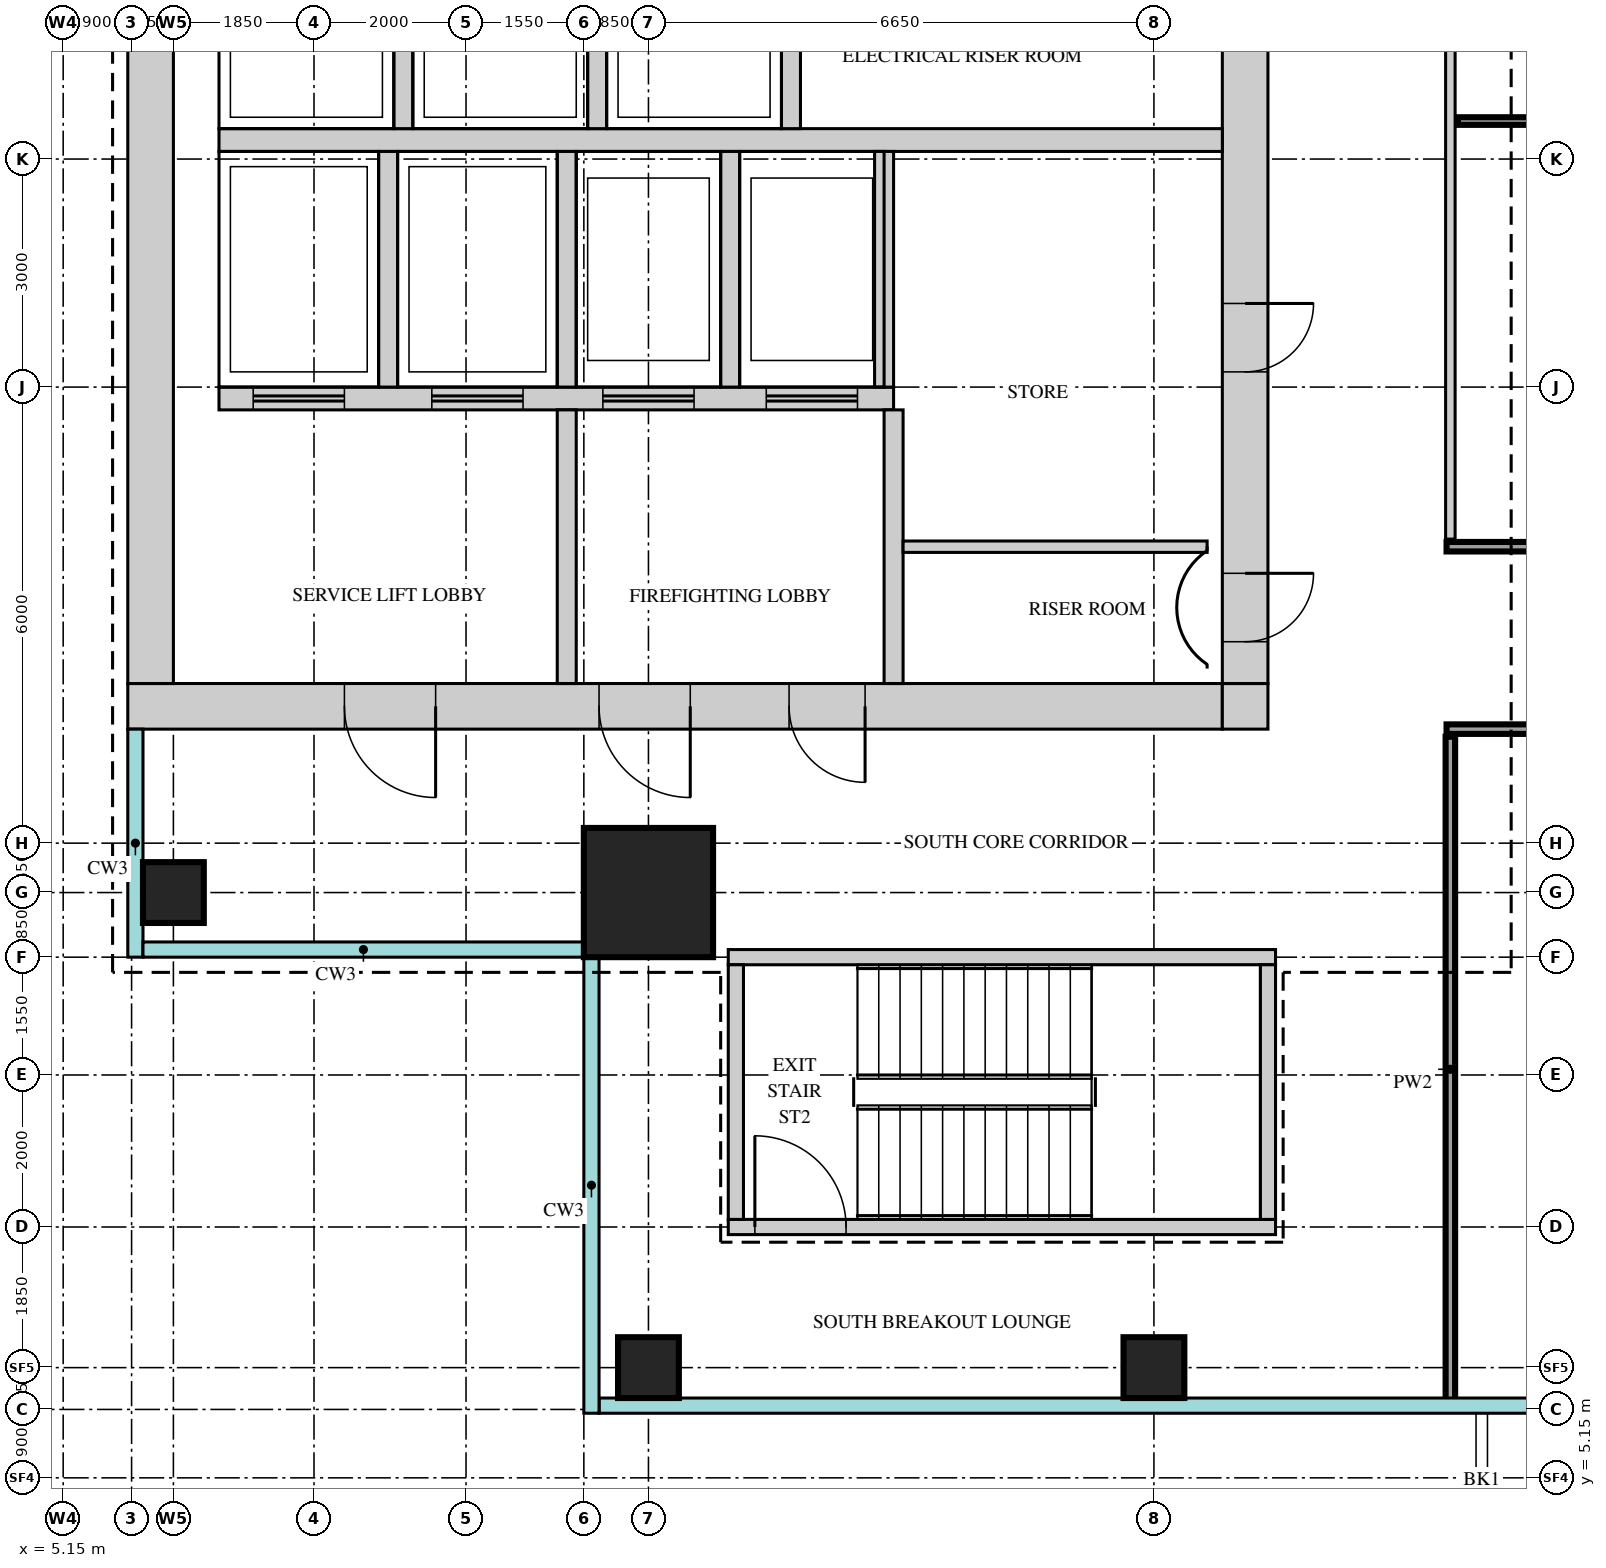
"""IFC4 building model, lengths in metres.
Left out: names, types, materials, properties, quantities, classifications, styles, units other than length and angle.
Written with IfcOpenShell. Run it as: python <this file> out.ifc"""

import sys

from ifc_helpers import new_model, si_unit, direction, frame, frame_2d, origin, origin_2d, place, context, subcontext, project, spatial, rectangle, extrude, source, transform, mapped, element, fill, save


model = new_model("IFC4")
c1 = context("Model", 3, precision=1e-05, world=origin(), true_north=direction((0.0, 1.0)))
c2 = subcontext(c1, "Body", "Model", "MODEL_VIEW")
j1 = project(units=[si_unit("LENGTHUNIT", "METRE"), si_unit("PLANEANGLEUNIT", "RADIAN")], contexts=[c1])
p1 = place(None, origin())
s1 = spatial("IfcSite", under=j1, at=p1, CompositionType="ELEMENT")
p2 = place(p1, origin())
s2 = spatial("IfcBuilding", under=s1, at=p2, CompositionType="ELEMENT")
p3 = place(p2, frame((0.0, 0.0, 298.2)))
s3 = spatial("IfcBuildingStorey", under=s2, at=p3, CompositionType="ELEMENT", Elevation=298.2)
m1 = source(origin(), c2, "Body", "SweptSolid", [
    extrude(rectangle(XDim=14.4, YDim=0.6, at=frame_2d((7.2, 0.0))), origin(), (0.0, 0.0, 1.0), 3.75),
])
p4 = place(p3, frame((6.0, 15.3, 0.0), z_axis=(0.0, 0.0, 1.0), x_axis=(1.0, 0.0, 0.0)))
e1 = element("IfcWall", 1, at=p4, inside=s3, PredefinedType="SHEAR", context=c2, shape_type="MappedRepresentation", body=[
    mapped(m1, transform((0.0, 0.0, 0.0))),
])
m2 = source(origin(), c2, "Body", "SweptSolid", [
    extrude(rectangle(XDim=1.2, YDim=2.1, at=frame_2d((0.6, 1.05))), frame((0.0, 0.31, 0.0), z_axis=(0.0, -1.0, 0.0), x_axis=(1.0, 0.0, 0.0)), (0.0, 0.0, 1.0), 0.62),
])
p5 = place(p4, frame((6.2, 0.0, 0.0)))
e2 = element("IfcOpeningElement", 2, at=p5, cuts=e1, PredefinedType="OPENING", context=c2, shape_type="MappedRepresentation", body=[
    mapped(m2, transform((0.0, 0.0, 0.0))),
])
p6 = place(p4, frame((2.85, 0.0, 0.0)))
e3 = element("IfcOpeningElement", 3, at=p6, cuts=e1, PredefinedType="OPENING", context=c2, shape_type="MappedRepresentation", body=[
    mapped(m2, transform((0.0, 0.0, 0.0))),
])
m3 = source(origin(), c2, "Body", "SweptSolid", [
    extrude(rectangle(XDim=1.0, YDim=2.1, at=frame_2d((0.5, 1.05))), frame((0.0, 0.31, 0.0), z_axis=(0.0, -1.0, 0.0), x_axis=(1.0, 0.0, 0.0)), (0.0, 0.0, 1.0), 0.62),
])
p7 = place(p4, frame((8.7, 0.0, 0.0)))
e4 = element("IfcOpeningElement", 4, at=p7, cuts=e1, PredefinedType="OPENING", context=c2, shape_type="MappedRepresentation", body=[
    mapped(m3, transform((0.0, 0.0, 0.0))),
])
m4 = source(origin(), c2, "Body", "SweptSolid", [
    extrude(rectangle(XDim=0.6, YDim=0.6, at=frame_2d((0.3, 0.0))), origin(), (0.0, 0.0, 1.0), 3.75),
])
p8 = place(p3, frame((20.4, 15.3, 0.0), z_axis=(0.0, 0.0, 1.0), x_axis=(1.0, 0.0, 0.0)))
e5 = element("IfcWall", 5, at=p8, inside=s3, PredefinedType="SHEAR", context=c2, shape_type="MappedRepresentation", body=[
    mapped(m4, transform((0.0, 0.0, 0.0))),
])
m5 = source(origin(), c2, "Body", "SweptSolid", [
    extrude(rectangle(XDim=22.8, YDim=0.6, at=frame_2d((11.4, 0.0))), origin(), (0.0, 0.0, 1.0), 3.75),
])
p9 = place(p3, frame((20.7, 15.6, 0.0), z_axis=(0.0, 0.0, 1.0), x_axis=(0.0, 1.0, 0.0)))
e6 = element("IfcWall", 6, at=p9, inside=s3, PredefinedType="SHEAR", context=c2, shape_type="MappedRepresentation", body=[
    mapped(m5, transform((0.0, 0.0, 0.0))),
])
m6 = source(origin(), c2, "Body", "SweptSolid", [
    extrude(rectangle(XDim=1.8, YDim=2.1, at=frame_2d((0.9, 1.05))), frame((0.0, 0.31, 0.0), z_axis=(0.0, -1.0, 0.0), x_axis=(1.0, 0.0, 0.0)), (0.0, 0.0, 1.0), 0.62),
])
p10 = place(p9, frame((10.9, 0.0, 0.0)))
e7 = element("IfcOpeningElement", 7, at=p10, cuts=e6, PredefinedType="OPENING", context=c2, shape_type="MappedRepresentation", body=[
    mapped(m6, transform((0.0, 0.0, 0.0))),
])
m7 = source(origin(), c2, "Body", "SweptSolid", [
    extrude(rectangle(XDim=0.9, YDim=2.1, at=frame_2d((0.45, 1.05))), frame((0.0, 0.31, 0.0), z_axis=(0.0, -1.0, 0.0), x_axis=(1.0, 0.0, 0.0)), (0.0, 0.0, 1.0), 0.62),
])
p11 = place(p9, frame((0.55, 0.0, 0.0)))
e8 = element("IfcOpeningElement", 8, at=p11, cuts=e6, PredefinedType="OPENING", context=c2, shape_type="MappedRepresentation", body=[
    mapped(m7, transform((0.0, 0.0, 0.0))),
])
p12 = place(p9, frame((4.1, 0.0, 0.0)))
e9 = element("IfcOpeningElement", 9, at=p12, cuts=e6, PredefinedType="OPENING", context=c2, shape_type="MappedRepresentation", body=[
    mapped(m7, transform((0.0, 0.0, 0.0))),
])
p13 = place(p3, frame((6.3, 15.6, 0.0), z_axis=(0.0, 0.0, 1.0), x_axis=(0.0, 1.0, 0.0)))
e10 = element("IfcWall", 10, at=p13, inside=s3, PredefinedType="SHEAR", context=c2, shape_type="MappedRepresentation", body=[
    mapped(m5, transform((0.0, 0.0, 0.0))),
])
m8 = source(origin(), c2, "Body", "SweptSolid", [
    extrude(rectangle(XDim=7.2, YDim=0.2, at=frame_2d((3.6, 0.0))), origin(), (0.0, 0.0, 1.0), 3.75),
])
p14 = place(p3, frame((13.9, 12.0, 0.0), z_axis=(0.0, 0.0, 1.0), x_axis=(1.0, 0.0, 0.0)))
e11 = element("IfcWall", 11, at=p14, inside=s3, PredefinedType="SHEAR", context=c2, shape_type="MappedRepresentation", body=[
    mapped(m8, transform((0.0, 0.0, 0.0))),
])
p15 = place(p3, frame((13.9, 8.45, 0.0), z_axis=(0.0, 0.0, 1.0), x_axis=(1.0, 0.0, 0.0)))
e12 = element("IfcWall", 12, at=p15, inside=s3, PredefinedType="SHEAR", context=c2, shape_type="MappedRepresentation", body=[
    mapped(m8, transform((0.0, 0.0, 0.0))),
])
m9 = source(origin(), c2, "Body", "SweptSolid", [
    extrude(rectangle(XDim=1.2, YDim=2.1, at=frame_2d((0.6, 1.05))), frame((0.0, 0.11, 0.0), z_axis=(0.0, -1.0, 0.0), x_axis=(1.0, 0.0, 0.0)), (0.0, 0.0, 1.0), 0.22),
])
p16 = place(p15, frame((0.35, 0.0, 0.0)))
e13 = element("IfcOpeningElement", 13, at=p16, cuts=e12, PredefinedType="OPENING", context=c2, shape_type="MappedRepresentation", body=[
    mapped(m9, transform((0.0, 0.0, 0.0))),
])
m10 = source(origin(), c2, "Body", "SweptSolid", [
    extrude(rectangle(XDim=3.35, YDim=0.2, at=frame_2d((1.675, 0.0))), origin(), (0.0, 0.0, 1.0), 3.75),
])
for number, where, z_axis, x_axis in (
    (14, (21.0, 8.55, 0.0), (0.0, 0.0, 1.0), (0.0, 1.0, 0.0)),
    (15, (14.0, 8.55, 0.0), (0.0, 0.0, 1.0), (0.0, 1.0, 0.0)),
):
    element("IfcWall", number, at=place(p3, frame(where, z_axis=z_axis, x_axis=x_axis)), inside=s3, PredefinedType="SHEAR", context=c2, shape_type="MappedRepresentation", body=[
        mapped(m10, transform((0.0, 0.0, 0.0))),
    ])
m11 = source(origin(), c2, "Body", "SweptSolid", [
    extrude(rectangle(XDim=13.2, YDim=0.3, at=frame_2d((6.6, 0.0))), origin(), (0.0, 0.0, 1.0), 3.75),
])
p17 = place(p3, frame((7.2, 22.75, 0.0), z_axis=(0.0, 0.0, 1.0), x_axis=(1.0, 0.0, 0.0)))
e16 = element("IfcWall", 16, at=p17, inside=s3, PredefinedType="STANDARD", context=c2, shape_type="MappedRepresentation", body=[
    mapped(m11, transform((0.0, 0.0, 0.0))),
])
m12 = source(origin(), c2, "Body", "SweptSolid", [
    extrude(rectangle(XDim=8.875, YDim=0.3, at=frame_2d((4.438, 0.0))), origin(), (0.0, 0.0, 1.0), 3.75),
])
p18 = place(p3, frame((7.2, 19.35, 0.0), z_axis=(0.0, 0.0, 1.0), x_axis=(1.0, 0.0, 0.0)))
e17 = element("IfcWall", 17, at=p18, inside=s3, PredefinedType="STANDARD", context=c2, shape_type="MappedRepresentation", body=[
    mapped(m12, transform((0.0, 0.0, 0.0))),
])
m13 = source(origin(), c2, "Body", "SweptSolid", [
    extrude(rectangle(XDim=1.2, YDim=2.1, at=frame_2d((0.6, 1.05))), frame((0.0, 0.16, 0.0), z_axis=(0.0, -1.0, 0.0), x_axis=(1.0, 0.0, 0.0)), (0.0, 0.0, 1.0), 0.32),
])
p19 = place(p18, frame((0.45, 0.0, 0.0)))
e18 = element("IfcOpeningElement", 18, at=p19, cuts=e17, PredefinedType="OPENING", context=c2, shape_type="MappedRepresentation", body=[
    mapped(m13, transform((0.0, 0.0, 0.0))),
])
p20 = place(p18, frame((2.8, 0.0, 0.0)))
e19 = element("IfcOpeningElement", 19, at=p20, cuts=e17, PredefinedType="OPENING", context=c2, shape_type="MappedRepresentation", body=[
    mapped(m13, transform((0.0, 0.0, 0.0))),
])
p21 = place(p18, frame((5.05, 0.0, 0.0)))
e20 = element("IfcOpeningElement", 20, at=p21, cuts=e17, PredefinedType="OPENING", context=c2, shape_type="MappedRepresentation", body=[
    mapped(m13, transform((0.0, 0.0, 0.0))),
])
p22 = place(p18, frame((7.2, 0.0, 0.0)))
e21 = element("IfcOpeningElement", 21, at=p22, cuts=e17, PredefinedType="OPENING", context=c2, shape_type="MappedRepresentation", body=[
    mapped(m13, transform((0.0, 0.0, 0.0))),
])
m14 = source(origin(), c2, "Body", "SweptSolid", [
    extrude(rectangle(XDim=3.1, YDim=0.25, at=frame_2d((1.55, 0.0))), origin(), (0.0, 0.0, 1.0), 3.75),
])
for number, where, z_axis, x_axis in (
    (22, (9.425, 19.5, 0.0), (0.0, 0.0, 1.0), (0.0, 1.0, 0.0)),
    (23, (11.775, 19.5, 0.0), (0.0, 0.0, 1.0), (0.0, 1.0, 0.0)),
    (24, (13.925, 19.5, 0.0), (0.0, 0.0, 1.0), (0.0, 1.0, 0.0)),
    (25, (15.95, 19.5, 0.0), (0.0, 0.0, 1.0), (0.0, 1.0, 0.0)),
):
    element("IfcWall", number, at=place(p3, frame(where, z_axis=z_axis, x_axis=x_axis)), inside=s3, PredefinedType="STANDARD", context=c2, shape_type="MappedRepresentation", body=[
        mapped(m14, transform((0.0, 0.0, 0.0))),
    ])
m15 = source(origin(), c2, "Body", "SweptSolid", [
    extrude(rectangle(XDim=2.4, YDim=0.25, at=frame_2d((1.2, 0.0))), origin(), (0.0, 0.0, 1.0), 3.75),
])
for number, where, z_axis, x_axis in (
    (26, (9.625, 22.9, 0.0), (0.0, 0.0, 1.0), (0.0, 1.0, 0.0)),
    (27, (12.175, 22.9, 0.0), (0.0, 0.0, 1.0), (0.0, 1.0, 0.0)),
    (28, (14.725, 22.9, 0.0), (0.0, 0.0, 1.0), (0.0, 1.0, 0.0)),
):
    element("IfcWall", number, at=place(p3, frame(where, z_axis=z_axis, x_axis=x_axis)), inside=s3, PredefinedType="STANDARD", context=c2, shape_type="MappedRepresentation", body=[
        mapped(m15, transform((0.0, 0.0, 0.0))),
    ])
m16 = source(origin(), c2, "Body", "SweptSolid", [
    extrude(rectangle(XDim=3.6, YDim=0.25, at=frame_2d((1.8, 0.0))), origin(), (0.0, 0.0, 1.0), 3.75),
])
for number, where, z_axis, x_axis in (
    (29, (16.075, 15.6, 0.0), (0.0, 0.0, 1.0), (0.0, 1.0, 0.0)),
    (30, (11.775, 15.6, 0.0), (0.0, 0.0, 1.0), (0.0, 1.0, 0.0)),
):
    element("IfcWall", number, at=place(p3, frame(where, z_axis=z_axis, x_axis=x_axis)), inside=s3, PredefinedType="STANDARD", context=c2, shape_type="MappedRepresentation", body=[
        mapped(m16, transform((0.0, 0.0, 0.0))),
    ])
m17 = source(origin(), c2, "Body", "SweptSolid", [
    extrude(rectangle(XDim=1.7, YDim=1.7, at=origin_2d()), origin(), (0.0, 0.0, 1.0), 3.75),
])
p23 = place(p3, frame((12.85, 12.85, 0.0), z_axis=(0.0, 0.0, 1.0), x_axis=(1.0, 0.0, 0.0)))
e31 = element("IfcColumn", 31, at=p23, inside=s3, PredefinedType="COLUMN", context=c2, shape_type="MappedRepresentation", body=[
    mapped(m17, transform((0.0, 0.0, 0.0))),
])
m18 = source(origin(), c2, "Body", "SweptSolid", [
    extrude(rectangle(XDim=0.8, YDim=0.8, at=origin_2d()), origin(), (0.0, 0.0, 1.0), 3.75),
])
for number, where, z_axis, x_axis in (
    (32, (12.85, 6.6, 0.0), (0.0, 0.0, 1.0), (1.0, 0.0, 0.0)),
    (33, (19.5, 6.6, 0.0), (0.0, 0.0, 1.0), (1.0, 0.0, 0.0)),
    (34, (6.6, 12.85, 0.0), (0.0, 0.0, 1.0), (1.0, 0.0, 0.0)),
):
    element("IfcColumn", number, at=place(p3, frame(where, z_axis=z_axis, x_axis=x_axis)), inside=s3, PredefinedType="COLUMN", context=c2, shape_type="MappedRepresentation", body=[
        mapped(m18, transform((0.0, 0.0, 0.0))),
    ])
m19 = source(origin(), c2, "Body", "SweptSolid", [
    extrude(rectangle(XDim=8.75, YDim=0.125, at=frame_2d((4.375, 0.0))), origin(), (0.0, 0.0, 1.0), 3.8),
])
p24 = place(p3, frame((23.4, 6.15, 0.0), z_axis=(0.0, 0.0, 1.0), x_axis=(0.0, 1.0, 0.0)))
e35 = element("IfcWall", 35, at=p24, inside=s3, PredefinedType="PARTITIONING", context=c2, shape_type="MappedRepresentation", body=[
    mapped(m19, transform((0.0, 0.0, 0.0))),
])
m20 = source(origin(), c2, "Body", "SweptSolid", [
    extrude(rectangle(XDim=19.1, YDim=0.125, at=frame_2d((9.55, 0.0))), origin(), (0.0, 0.0, 1.0), 3.8),
])
p25 = place(p3, frame((23.35, 15.0, 0.0), z_axis=(0.0, 0.0, 1.0), x_axis=(1.0, 0.0, 0.0)))
e36 = element("IfcWall", 36, at=p25, inside=s3, PredefinedType="PARTITIONING", context=c2, shape_type="MappedRepresentation", body=[
    mapped(m20, transform((0.0, 0.0, 0.0))),
])
m21 = source(origin(), c2, "Body", "SweptSolid", [
    extrude(rectangle(XDim=0.9, YDim=2.1, at=frame_2d((0.45, 1.05))), frame((0.0, 0.073, 0.0), z_axis=(0.0, -1.0, 0.0), x_axis=(1.0, 0.0, 0.0)), (0.0, 0.0, 1.0), 0.145),
])
p26 = place(p25, frame((5.3, 0.0, 0.0)))
e37 = element("IfcOpeningElement", 37, at=p26, cuts=e36, PredefinedType="OPENING", context=c2, shape_type="MappedRepresentation", body=[
    mapped(m21, transform((0.0, 0.0, 0.0))),
])
p27 = place(p25, frame((13.3, 0.0, 0.0)))
e38 = element("IfcOpeningElement", 38, at=p27, cuts=e36, PredefinedType="OPENING", context=c2, shape_type="MappedRepresentation", body=[
    mapped(m21, transform((0.0, 0.0, 0.0))),
])
p28 = place(p25, frame((17.95, 0.0, 0.0)))
e39 = element("IfcOpeningElement", 39, at=p28, cuts=e36, PredefinedType="OPENING", context=c2, shape_type="MappedRepresentation", body=[
    mapped(m21, transform((0.0, 0.0, 0.0))),
])
m22 = source(origin(), c2, "Body", "SweptSolid", [
    extrude(rectangle(XDim=4.0, YDim=0.15, at=frame_2d((2.0, 0.0))), origin(), (0.0, 0.0, 1.0), 3.8),
])
p29 = place(p3, frame((16.2, 17.4, 0.0), z_axis=(0.0, 0.0, 1.0), x_axis=(1.0, 0.0, 0.0)))
e40 = element("IfcWall", 40, at=p29, inside=s3, PredefinedType="PARTITIONING", context=c2, shape_type="MappedRepresentation", body=[
    mapped(m22, transform((0.0, 0.0, 0.0))),
])
m23 = source(origin(), c2, "Body", "SweptSolid", [
    extrude(rectangle(XDim=16.7, YDim=0.125, at=frame_2d((8.35, 0.0))), origin(), (0.0, 0.0, 1.0), 3.8),
])
p30 = place(p3, frame((23.35, 17.4, 0.0), z_axis=(0.0, 0.0, 1.0), x_axis=(1.0, 0.0, 0.0)))
e41 = element("IfcWall", 41, at=p30, inside=s3, PredefinedType="PARTITIONING", context=c2, shape_type="MappedRepresentation", body=[
    mapped(m23, transform((0.0, 0.0, 0.0))),
])
p31 = place(p30, frame((8.05, 0.0, 0.0)))
e42 = element("IfcOpeningElement", 42, at=p31, cuts=e41, PredefinedType="OPENING", context=c2, shape_type="MappedRepresentation", body=[
    mapped(m21, transform((0.0, 0.0, 0.0))),
])
m24 = source(origin(), c2, "Body", "SweptSolid", [
    extrude(rectangle(XDim=19.0, YDim=0.125, at=frame_2d((9.5, 0.0))), origin(), (0.0, 0.0, 1.0), 3.8),
])
p32 = place(p3, frame((23.4, 17.5, 0.0), z_axis=(0.0, 0.0, 1.0), x_axis=(0.0, 1.0, 0.0)))
e43 = element("IfcWall", 43, at=p32, inside=s3, PredefinedType="PARTITIONING", context=c2, shape_type="MappedRepresentation", body=[
    mapped(m24, transform((0.0, 0.0, 0.0))),
])
p33 = place(p32, frame((8.4, 0.0, 0.0)))
e44 = element("IfcOpeningElement", 44, at=p33, cuts=e43, PredefinedType="OPENING", context=c2, shape_type="MappedRepresentation", body=[
    mapped(m21, transform((0.0, 0.0, 0.0))),
])
m25 = source(origin(), c2, "Body", "SweptSolid", [
    extrude(rectangle(XDim=16.4, YDim=0.1, at=frame_2d((8.2, 0.0))), origin(), (0.0, 0.0, 1.0), 3.8),
])
p34 = place(p3, frame((23.5, 23.0, 0.0), z_axis=(0.0, 0.0, 1.0), x_axis=(1.0, 0.0, 0.0)))
e45 = element("IfcWall", 45, at=p34, inside=s3, PredefinedType="PARTITIONING", context=c2, shape_type="MappedRepresentation", body=[
    mapped(m25, transform((0.0, 0.0, 0.0))),
])
m26 = source(origin(), c2, "Body", "SweptSolid", [
    extrude(rectangle(XDim=0.9, YDim=2.1, at=frame_2d((0.45, 1.05))), frame((0.0, 0.25, 0.0), z_axis=(0.0, -1.0, 0.0), x_axis=(1.0, 0.0, 0.0)), (0.0, 0.0, 1.0), 0.5),
])
p35 = place(p11, origin())
e46 = element("IfcDoor", 46, at=p35, inside=s3, OperationType="SINGLE_SWING_RIGHT", PredefinedType="DOOR", context=c2, shape_type="MappedRepresentation", body=[
    mapped(m26, transform((0.0, 0.0, 0.0))),
])
fill(e8, e46)
p36 = place(p12, origin())
e47 = element("IfcDoor", 47, at=p36, inside=s3, OperationType="SINGLE_SWING_RIGHT", PredefinedType="DOOR", context=c2, shape_type="MappedRepresentation", body=[
    mapped(m26, transform((0.0, 0.0, 0.0))),
])
fill(e9, e47)
m27 = source(origin(), c2, "Body", "SweptSolid", [
    extrude(rectangle(XDim=1.2, YDim=2.1, at=frame_2d((0.6, 1.05))), frame((0.0, 0.25, 0.0), z_axis=(0.0, -1.0, 0.0), x_axis=(1.0, 0.0, 0.0)), (0.0, 0.0, 1.0), 0.5),
])
p37 = place(p5, origin())
e48 = element("IfcDoor", 48, at=p37, inside=s3, OperationType="SINGLE_SWING_RIGHT", PredefinedType="DOOR", context=c2, shape_type="MappedRepresentation", body=[
    mapped(m27, transform((0.0, 0.0, 0.0))),
])
fill(e2, e48)
p38 = place(p6, origin())
e49 = element("IfcDoor", 49, at=p38, inside=s3, OperationType="SINGLE_SWING_RIGHT", PredefinedType="DOOR", context=c2, shape_type="MappedRepresentation", body=[
    mapped(m27, transform((0.0, 0.0, 0.0))),
])
fill(e3, e49)
m28 = source(origin(), c2, "Body", "SweptSolid", [
    extrude(rectangle(XDim=1.0, YDim=2.1, at=frame_2d((0.5, 1.05))), frame((0.0, 0.25, 0.0), z_axis=(0.0, -1.0, 0.0), x_axis=(1.0, 0.0, 0.0)), (0.0, 0.0, 1.0), 0.5),
])
p39 = place(p7, origin())
e50 = element("IfcDoor", 50, at=p39, inside=s3, OperationType="SINGLE_SWING_RIGHT", PredefinedType="DOOR", context=c2, shape_type="MappedRepresentation", body=[
    mapped(m28, transform((0.0, 0.0, 0.0))),
])
fill(e4, e50)
m29 = source(origin(), c2, "Body", "SweptSolid", [
    extrude(rectangle(XDim=1.2, YDim=2.1, at=frame_2d((0.6, 1.05))), frame((0.0, 0.025, 0.0), z_axis=(0.0, -1.0, 0.0), x_axis=(1.0, 0.0, 0.0)), (0.0, 0.0, 1.0), 0.05),
])
p40 = place(p16, origin())
e51 = element("IfcDoor", 51, at=p40, inside=s3, OperationType="SINGLE_SWING_RIGHT", PredefinedType="DOOR", context=c2, shape_type="MappedRepresentation", body=[
    mapped(m29, transform((0.0, 0.0, 0.0))),
])
fill(e13, e51)
p41 = place(p19, origin())
e52 = element("IfcDoor", 52, at=p41, inside=s3, OperationType="DOUBLE_DOOR_SLIDING", PredefinedType="DOOR", context=c2, shape_type="MappedRepresentation", body=[
    mapped(m29, transform((0.0, 0.0, 0.0))),
])
fill(e18, e52)
p42 = place(p20, origin())
e53 = element("IfcDoor", 53, at=p42, inside=s3, OperationType="DOUBLE_DOOR_SLIDING", PredefinedType="DOOR", context=c2, shape_type="MappedRepresentation", body=[
    mapped(m29, transform((0.0, 0.0, 0.0))),
])
fill(e19, e53)
p43 = place(p21, origin())
e54 = element("IfcDoor", 54, at=p43, inside=s3, OperationType="DOUBLE_DOOR_SLIDING", PredefinedType="DOOR", context=c2, shape_type="MappedRepresentation", body=[
    mapped(m29, transform((0.0, 0.0, 0.0))),
])
fill(e20, e54)
p44 = place(p22, origin())
e55 = element("IfcDoor", 55, at=p44, inside=s3, OperationType="DOUBLE_DOOR_SLIDING", PredefinedType="DOOR", context=c2, shape_type="MappedRepresentation", body=[
    mapped(m29, transform((0.0, 0.0, 0.0))),
])
fill(e21, e55)
save(model, sys.argv[1])
